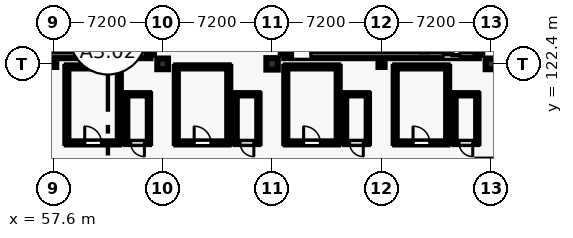
"""IFC4 building model, lengths in metres.
Left out: names, types, materials, properties, quantities, classifications, styles, units other than length and angle.
Written with IfcOpenShell. Run it as: python <this file> out.ifc"""

import sys

from ifc_helpers import new_model, si_unit, direction, frame, frame_2d, origin, origin_2d, place, context, subcontext, project, spatial, rectangle, hollow_rectangle, extrude, element, fill, save


model = new_model("IFC4")
c1 = context("Model", 3, precision=1e-05, world=origin(), true_north=direction((0.0, 1.0)))
c2 = subcontext(c1, "Body", "Model", "MODEL_VIEW")
j1 = project(units=[si_unit("LENGTHUNIT", "METRE"), si_unit("PLANEANGLEUNIT", "RADIAN")], contexts=[c1])
p1 = place(None, origin())
s1 = spatial("IfcSite", under=j1, at=p1, CompositionType="ELEMENT")
p2 = place(p1, origin())
s2 = spatial("IfcBuilding", under=s1, at=p2, CompositionType="ELEMENT")
p3 = place(p2, frame((0.0, 0.0, 9.6)))
s3 = spatial("IfcBuildingStorey", under=s2, at=p3, CompositionType="ELEMENT", Elevation=9.6)
p4 = place(p3, frame((57.6, 122.4, 0.0), z_axis=(0.0, 0.0, 1.0), x_axis=(1.0, 0.0, 0.0)))
e1 = element("IfcColumn", 1, at=p4, inside=s3, PredefinedType="COLUMN", context=c2, shape_type="SweptSolid", body=[
    extrude(hollow_rectangle(XDim=0.4, YDim=0.4, WallThickness=0.02, at=origin_2d()), origin(), (0.0, 0.0, 1.0), 4.2),
])
p5 = place(p3, frame((64.8, 122.4, 0.0), z_axis=(0.0, 0.0, 1.0), x_axis=(1.0, 0.0, 0.0)))
e2 = element("IfcColumn", 2, at=p5, inside=s3, PredefinedType="COLUMN", context=c2, shape_type="SweptSolid", body=[
    extrude(rectangle(XDim=0.7, YDim=0.7, at=origin_2d()), origin(), (0.0, 0.0, 1.0), 4.2),
])
p6 = place(p3, frame((72.0, 122.4, 0.0), z_axis=(0.0, 0.0, 1.0), x_axis=(1.0, 0.0, 0.0)))
e3 = element("IfcColumn", 3, at=p6, inside=s3, PredefinedType="COLUMN", context=c2, shape_type="SweptSolid", body=[
    extrude(rectangle(XDim=0.75, YDim=0.75, at=origin_2d()), origin(), (0.0, 0.0, 1.0), 4.2),
])
p7 = place(p3, frame((79.2, 122.4, 0.0), z_axis=(0.0, 0.0, 1.0), x_axis=(1.0, 0.0, 0.0)))
e4 = element("IfcColumn", 4, at=p7, inside=s3, PredefinedType="COLUMN", context=c2, shape_type="SweptSolid", body=[
    extrude(hollow_rectangle(XDim=0.4, YDim=0.4, WallThickness=0.02, at=origin_2d()), origin(), (0.0, 0.0, 1.0), 4.2),
])
p8 = place(p3, frame((86.4, 122.4, 0.0), z_axis=(0.0, 0.0, 1.0), x_axis=(1.0, 0.0, 0.0)))
e5 = element("IfcColumn", 5, at=p8, inside=s3, PredefinedType="COLUMN", context=c2, shape_type="SweptSolid", body=[
    extrude(rectangle(XDim=0.7, YDim=0.7, at=origin_2d()), origin(), (0.0, 0.0, 1.0), 4.2),
])
p9 = place(p3, frame((72.8, 123.0, 0.0), z_axis=(0.0, 0.0, 1.0), x_axis=(1.0, 0.0, 0.0)))
e6 = element("IfcWall", 6, at=p9, inside=s3, PredefinedType="SHEAR", context=c2, shape_type="SweptSolid", body=[
    extrude(rectangle(XDim=12.8, YDim=0.45, at=frame_2d((6.4, 0.0))), origin(), (0.0, 0.0, 1.0), 3.88),
])
p10 = place(p9, frame((0.55, 0.0, 0.0)))
e7 = element("IfcOpeningElement", 7, at=p10, cuts=e6, PredefinedType="OPENING", context=c2, shape_type="SweptSolid", body=[
    extrude(rectangle(XDim=1.2, YDim=2.25, at=frame_2d((0.6, 1.125))), frame((0.0, 0.235, 0.0), z_axis=(0.0, -1.0, 0.0), x_axis=(1.0, 0.0, 0.0)), (0.0, 0.0, 1.0), 0.47),
])
p11 = place(p9, frame((10.458, 0.0, 0.0)))
e8 = element("IfcOpeningElement", 8, at=p11, cuts=e6, PredefinedType="OPENING", context=c2, shape_type="SweptSolid", body=[
    extrude(rectangle(XDim=1.1, YDim=2.2, at=frame_2d((0.55, 1.1))), frame((0.0, 0.235, 0.0), z_axis=(0.0, -1.0, 0.0), x_axis=(1.0, 0.0, 0.0)), (0.0, 0.0, 1.0), 0.47),
])
for number, where, z_axis, x_axis in (
    (9, (72.8, 123.0, 0.0), (0.0, 0.0, 1.0), (0.0, 1.0, 0.0)),
    (10, (85.6, 123.0, 0.0), (0.0, 0.0, 1.0), (0.0, 1.0, 0.0)),
):
    element("IfcWall", number, at=place(p3, frame(where, z_axis=z_axis, x_axis=x_axis)), inside=s3, PredefinedType="SHEAR", context=c2, shape_type="SweptSolid", body=[
        extrude(rectangle(XDim=6.1, YDim=0.45, at=frame_2d((3.05, 0.0))), origin(), (0.0, 0.0, 1.0), 3.88),
    ])
p12 = place(p3, frame((51.2, 123.0, 0.0), z_axis=(0.0, 0.0, 1.0), x_axis=(1.0, 0.0, 0.0)))
e11 = element("IfcWall", 11, at=p12, inside=s3, PredefinedType="SHEAR", context=c2, shape_type="SweptSolid", body=[
    extrude(rectangle(XDim=12.8, YDim=0.45, at=frame_2d((6.4, 0.0))), origin(), (0.0, 0.0, 1.0), 3.88),
])
p13 = place(p12, frame((0.55, 0.0, 0.0)))
e12 = element("IfcOpeningElement", 12, at=p13, cuts=e11, PredefinedType="OPENING", context=c2, shape_type="SweptSolid", body=[
    extrude(rectangle(XDim=1.2, YDim=2.25, at=frame_2d((0.6, 1.125))), frame((0.0, 0.235, 0.0), z_axis=(0.0, -1.0, 0.0), x_axis=(1.0, 0.0, 0.0)), (0.0, 0.0, 1.0), 0.47),
])
p14 = place(p12, frame((10.458, 0.0, 0.0)))
e13 = element("IfcOpeningElement", 13, at=p14, cuts=e11, PredefinedType="OPENING", context=c2, shape_type="SweptSolid", body=[
    extrude(rectangle(XDim=1.1, YDim=2.2, at=frame_2d((0.55, 1.1))), frame((0.0, 0.235, 0.0), z_axis=(0.0, -1.0, 0.0), x_axis=(1.0, 0.0, 0.0)), (0.0, 0.0, 1.0), 0.47),
])
p15 = place(p3, frame((64.0, 123.0, 0.0), z_axis=(0.0, 0.0, 1.0), x_axis=(0.0, 1.0, 0.0)))
e14 = element("IfcWall", 14, at=p15, inside=s3, PredefinedType="SHEAR", context=c2, shape_type="SweptSolid", body=[
    extrude(rectangle(XDim=6.1, YDim=0.45, at=frame_2d((3.05, 0.0))), origin(), (0.0, 0.0, 1.0), 3.88),
])
p16 = place(p3, frame((58.5, 117.2, 0.0), z_axis=(0.0, 0.0, 1.0), x_axis=(1.0, 0.0, 0.0)))
e15 = element("IfcWall", 15, at=p16, inside=s3, PredefinedType="PARTITIONING", context=c2, shape_type="SweptSolid", body=[
    extrude(rectangle(XDim=3.45, YDim=0.2, at=frame_2d((1.725, 0.0))), origin(), (0.0, 0.0, 1.0), 2.94),
])
p17 = place(p16, frame((1.175, 0.0, 0.0)))
e16 = element("IfcOpeningElement", 16, at=p17, cuts=e15, PredefinedType="OPENING", context=c2, shape_type="SweptSolid", body=[
    extrude(rectangle(XDim=1.1, YDim=2.25, at=frame_2d((0.55, 1.125))), frame((0.0, 0.11, 0.0), z_axis=(0.0, -1.0, 0.0), x_axis=(1.0, 0.0, 0.0)), (0.0, 0.0, 1.0), 0.22),
])
p18 = place(p3, frame((61.95, 117.2, 0.0), z_axis=(0.0, 0.0, 1.0), x_axis=(0.0, 1.0, 0.0)))
e17 = element("IfcWall", 17, at=p18, inside=s3, PredefinedType="PARTITIONING", context=c2, shape_type="SweptSolid", body=[
    extrude(rectangle(XDim=5.0, YDim=0.2, at=frame_2d((2.5, 0.0))), origin(), (0.0, 0.0, 1.0), 2.94),
])
p19 = place(p3, frame((61.95, 122.2, 0.0), z_axis=(0.0, 0.0, 1.0), x_axis=(-1.0, 0.0, 0.0)))
e18 = element("IfcWall", 18, at=p19, inside=s3, PredefinedType="PARTITIONING", context=c2, shape_type="SweptSolid", body=[
    extrude(rectangle(XDim=3.45, YDim=0.2, at=frame_2d((1.725, 0.0))), origin(), (0.0, 0.0, 1.0), 2.94),
])
p20 = place(p3, frame((58.5, 122.2, 0.0), z_axis=(0.0, 0.0, 1.0), x_axis=(0.0, -1.0, 0.0)))
e19 = element("IfcWall", 19, at=p20, inside=s3, PredefinedType="PARTITIONING", context=c2, shape_type="SweptSolid", body=[
    extrude(rectangle(XDim=5.0, YDim=0.2, at=frame_2d((2.5, 0.0))), origin(), (0.0, 0.0, 1.0), 2.94),
])
p21 = place(p3, frame((62.4, 117.2, 0.0), z_axis=(0.0, 0.0, 1.0), x_axis=(1.0, 0.0, 0.0)))
e20 = element("IfcWall", 20, at=p21, inside=s3, PredefinedType="PARTITIONING", context=c2, shape_type="SweptSolid", body=[
    extrude(rectangle(XDim=1.5, YDim=0.15, at=frame_2d((0.75, 0.0))), origin(), (0.0, 0.0, 1.0), 2.94),
])
p22 = place(p21, frame((0.3, 0.0, 0.0)))
e21 = element("IfcOpeningElement", 21, at=p22, cuts=e20, PredefinedType="OPENING", context=c2, shape_type="SweptSolid", body=[
    extrude(rectangle(XDim=0.9, YDim=2.15, at=frame_2d((0.45, 1.075))), frame((0.0, 0.085, 0.0), z_axis=(0.0, -1.0, 0.0), x_axis=(1.0, 0.0, 0.0)), (0.0, 0.0, 1.0), 0.17),
])
p23 = place(p3, frame((63.9, 117.2, 0.0), z_axis=(0.0, 0.0, 1.0), x_axis=(0.0, 1.0, 0.0)))
e22 = element("IfcWall", 22, at=p23, inside=s3, PredefinedType="PARTITIONING", context=c2, shape_type="SweptSolid", body=[
    extrude(rectangle(XDim=3.2, YDim=0.15, at=frame_2d((1.6, 0.0))), origin(), (0.0, 0.0, 1.0), 2.94),
])
p24 = place(p3, frame((63.9, 120.4, 0.0), z_axis=(0.0, 0.0, 1.0), x_axis=(-1.0, 0.0, 0.0)))
e23 = element("IfcWall", 23, at=p24, inside=s3, PredefinedType="PARTITIONING", context=c2, shape_type="SweptSolid", body=[
    extrude(rectangle(XDim=1.5, YDim=0.15, at=frame_2d((0.75, 0.0))), origin(), (0.0, 0.0, 1.0), 2.94),
])
p25 = place(p3, frame((62.4, 120.4, 0.0), z_axis=(0.0, 0.0, 1.0), x_axis=(0.0, -1.0, 0.0)))
e24 = element("IfcWall", 24, at=p25, inside=s3, PredefinedType="PARTITIONING", context=c2, shape_type="SweptSolid", body=[
    extrude(rectangle(XDim=3.2, YDim=0.15, at=frame_2d((1.6, 0.0))), origin(), (0.0, 0.0, 1.0), 2.94),
])
p26 = place(p3, frame((65.7, 117.2, 0.0), z_axis=(0.0, 0.0, 1.0), x_axis=(1.0, 0.0, 0.0)))
e25 = element("IfcWall", 25, at=p26, inside=s3, PredefinedType="PARTITIONING", context=c2, shape_type="SweptSolid", body=[
    extrude(rectangle(XDim=3.45, YDim=0.2, at=frame_2d((1.725, 0.0))), origin(), (0.0, 0.0, 1.0), 2.94),
])
p27 = place(p26, frame((1.175, 0.0, 0.0)))
e26 = element("IfcOpeningElement", 26, at=p27, cuts=e25, PredefinedType="OPENING", context=c2, shape_type="SweptSolid", body=[
    extrude(rectangle(XDim=1.1, YDim=2.25, at=frame_2d((0.55, 1.125))), frame((0.0, 0.11, 0.0), z_axis=(0.0, -1.0, 0.0), x_axis=(1.0, 0.0, 0.0)), (0.0, 0.0, 1.0), 0.22),
])
p28 = place(p3, frame((69.15, 117.2, 0.0), z_axis=(0.0, 0.0, 1.0), x_axis=(0.0, 1.0, 0.0)))
e27 = element("IfcWall", 27, at=p28, inside=s3, PredefinedType="PARTITIONING", context=c2, shape_type="SweptSolid", body=[
    extrude(rectangle(XDim=5.0, YDim=0.2, at=frame_2d((2.5, 0.0))), origin(), (0.0, 0.0, 1.0), 2.94),
])
p29 = place(p3, frame((69.15, 122.2, 0.0), z_axis=(0.0, 0.0, 1.0), x_axis=(-1.0, 0.0, 0.0)))
e28 = element("IfcWall", 28, at=p29, inside=s3, PredefinedType="PARTITIONING", context=c2, shape_type="SweptSolid", body=[
    extrude(rectangle(XDim=3.45, YDim=0.2, at=frame_2d((1.725, 0.0))), origin(), (0.0, 0.0, 1.0), 2.94),
])
p30 = place(p3, frame((65.7, 122.2, 0.0), z_axis=(0.0, 0.0, 1.0), x_axis=(0.0, -1.0, 0.0)))
e29 = element("IfcWall", 29, at=p30, inside=s3, PredefinedType="PARTITIONING", context=c2, shape_type="SweptSolid", body=[
    extrude(rectangle(XDim=5.0, YDim=0.2, at=frame_2d((2.5, 0.0))), origin(), (0.0, 0.0, 1.0), 2.94),
])
p31 = place(p3, frame((69.6, 117.2, 0.0), z_axis=(0.0, 0.0, 1.0), x_axis=(1.0, 0.0, 0.0)))
e30 = element("IfcWall", 30, at=p31, inside=s3, PredefinedType="PARTITIONING", context=c2, shape_type="SweptSolid", body=[
    extrude(rectangle(XDim=1.5, YDim=0.15, at=frame_2d((0.75, 0.0))), origin(), (0.0, 0.0, 1.0), 2.94),
])
p32 = place(p31, frame((0.3, 0.0, 0.0)))
e31 = element("IfcOpeningElement", 31, at=p32, cuts=e30, PredefinedType="OPENING", context=c2, shape_type="SweptSolid", body=[
    extrude(rectangle(XDim=0.9, YDim=2.15, at=frame_2d((0.45, 1.075))), frame((0.0, 0.085, 0.0), z_axis=(0.0, -1.0, 0.0), x_axis=(1.0, 0.0, 0.0)), (0.0, 0.0, 1.0), 0.17),
])
p33 = place(p3, frame((71.1, 117.2, 0.0), z_axis=(0.0, 0.0, 1.0), x_axis=(0.0, 1.0, 0.0)))
e32 = element("IfcWall", 32, at=p33, inside=s3, PredefinedType="PARTITIONING", context=c2, shape_type="SweptSolid", body=[
    extrude(rectangle(XDim=3.2, YDim=0.15, at=frame_2d((1.6, 0.0))), origin(), (0.0, 0.0, 1.0), 2.94),
])
p34 = place(p3, frame((71.1, 120.4, 0.0), z_axis=(0.0, 0.0, 1.0), x_axis=(-1.0, 0.0, 0.0)))
e33 = element("IfcWall", 33, at=p34, inside=s3, PredefinedType="PARTITIONING", context=c2, shape_type="SweptSolid", body=[
    extrude(rectangle(XDim=1.5, YDim=0.15, at=frame_2d((0.75, 0.0))), origin(), (0.0, 0.0, 1.0), 2.94),
])
p35 = place(p3, frame((69.6, 120.4, 0.0), z_axis=(0.0, 0.0, 1.0), x_axis=(0.0, -1.0, 0.0)))
e34 = element("IfcWall", 34, at=p35, inside=s3, PredefinedType="PARTITIONING", context=c2, shape_type="SweptSolid", body=[
    extrude(rectangle(XDim=3.2, YDim=0.15, at=frame_2d((1.6, 0.0))), origin(), (0.0, 0.0, 1.0), 2.94),
])
p36 = place(p3, frame((72.9, 117.2, 0.0), z_axis=(0.0, 0.0, 1.0), x_axis=(1.0, 0.0, 0.0)))
e35 = element("IfcWall", 35, at=p36, inside=s3, PredefinedType="PARTITIONING", context=c2, shape_type="SweptSolid", body=[
    extrude(rectangle(XDim=3.45, YDim=0.2, at=frame_2d((1.725, 0.0))), origin(), (0.0, 0.0, 1.0), 2.94),
])
p37 = place(p36, frame((1.175, 0.0, 0.0)))
e36 = element("IfcOpeningElement", 36, at=p37, cuts=e35, PredefinedType="OPENING", context=c2, shape_type="SweptSolid", body=[
    extrude(rectangle(XDim=1.1, YDim=2.25, at=frame_2d((0.55, 1.125))), frame((0.0, 0.11, 0.0), z_axis=(0.0, -1.0, 0.0), x_axis=(1.0, 0.0, 0.0)), (0.0, 0.0, 1.0), 0.22),
])
p38 = place(p3, frame((76.35, 117.2, 0.0), z_axis=(0.0, 0.0, 1.0), x_axis=(0.0, 1.0, 0.0)))
e37 = element("IfcWall", 37, at=p38, inside=s3, PredefinedType="PARTITIONING", context=c2, shape_type="SweptSolid", body=[
    extrude(rectangle(XDim=5.0, YDim=0.2, at=frame_2d((2.5, 0.0))), origin(), (0.0, 0.0, 1.0), 2.94),
])
p39 = place(p3, frame((76.35, 122.2, 0.0), z_axis=(0.0, 0.0, 1.0), x_axis=(-1.0, 0.0, 0.0)))
e38 = element("IfcWall", 38, at=p39, inside=s3, PredefinedType="PARTITIONING", context=c2, shape_type="SweptSolid", body=[
    extrude(rectangle(XDim=3.45, YDim=0.2, at=frame_2d((1.725, 0.0))), origin(), (0.0, 0.0, 1.0), 2.94),
])
p40 = place(p3, frame((72.9, 122.2, 0.0), z_axis=(0.0, 0.0, 1.0), x_axis=(0.0, -1.0, 0.0)))
e39 = element("IfcWall", 39, at=p40, inside=s3, PredefinedType="PARTITIONING", context=c2, shape_type="SweptSolid", body=[
    extrude(rectangle(XDim=5.0, YDim=0.2, at=frame_2d((2.5, 0.0))), origin(), (0.0, 0.0, 1.0), 2.94),
])
p41 = place(p3, frame((76.8, 117.2, 0.0), z_axis=(0.0, 0.0, 1.0), x_axis=(1.0, 0.0, 0.0)))
e40 = element("IfcWall", 40, at=p41, inside=s3, PredefinedType="PARTITIONING", context=c2, shape_type="SweptSolid", body=[
    extrude(rectangle(XDim=1.5, YDim=0.15, at=frame_2d((0.75, 0.0))), origin(), (0.0, 0.0, 1.0), 2.94),
])
p42 = place(p41, frame((0.3, 0.0, 0.0)))
e41 = element("IfcOpeningElement", 41, at=p42, cuts=e40, PredefinedType="OPENING", context=c2, shape_type="SweptSolid", body=[
    extrude(rectangle(XDim=0.9, YDim=2.15, at=frame_2d((0.45, 1.075))), frame((0.0, 0.085, 0.0), z_axis=(0.0, -1.0, 0.0), x_axis=(1.0, 0.0, 0.0)), (0.0, 0.0, 1.0), 0.17),
])
p43 = place(p3, frame((78.3, 117.2, 0.0), z_axis=(0.0, 0.0, 1.0), x_axis=(0.0, 1.0, 0.0)))
e42 = element("IfcWall", 42, at=p43, inside=s3, PredefinedType="PARTITIONING", context=c2, shape_type="SweptSolid", body=[
    extrude(rectangle(XDim=3.2, YDim=0.15, at=frame_2d((1.6, 0.0))), origin(), (0.0, 0.0, 1.0), 2.94),
])
p44 = place(p3, frame((78.3, 120.4, 0.0), z_axis=(0.0, 0.0, 1.0), x_axis=(-1.0, 0.0, 0.0)))
e43 = element("IfcWall", 43, at=p44, inside=s3, PredefinedType="PARTITIONING", context=c2, shape_type="SweptSolid", body=[
    extrude(rectangle(XDim=1.5, YDim=0.15, at=frame_2d((0.75, 0.0))), origin(), (0.0, 0.0, 1.0), 2.94),
])
p45 = place(p3, frame((76.8, 120.4, 0.0), z_axis=(0.0, 0.0, 1.0), x_axis=(0.0, -1.0, 0.0)))
e44 = element("IfcWall", 44, at=p45, inside=s3, PredefinedType="PARTITIONING", context=c2, shape_type="SweptSolid", body=[
    extrude(rectangle(XDim=3.2, YDim=0.15, at=frame_2d((1.6, 0.0))), origin(), (0.0, 0.0, 1.0), 2.94),
])
p46 = place(p3, frame((80.1, 117.2, 0.0), z_axis=(0.0, 0.0, 1.0), x_axis=(1.0, 0.0, 0.0)))
e45 = element("IfcWall", 45, at=p46, inside=s3, PredefinedType="PARTITIONING", context=c2, shape_type="SweptSolid", body=[
    extrude(rectangle(XDim=3.45, YDim=0.2, at=frame_2d((1.725, 0.0))), origin(), (0.0, 0.0, 1.0), 2.94),
])
p47 = place(p46, frame((1.175, 0.0, 0.0)))
e46 = element("IfcOpeningElement", 46, at=p47, cuts=e45, PredefinedType="OPENING", context=c2, shape_type="SweptSolid", body=[
    extrude(rectangle(XDim=1.1, YDim=2.25, at=frame_2d((0.55, 1.125))), frame((0.0, 0.11, 0.0), z_axis=(0.0, -1.0, 0.0), x_axis=(1.0, 0.0, 0.0)), (0.0, 0.0, 1.0), 0.22),
])
p48 = place(p3, frame((83.55, 117.2, 0.0), z_axis=(0.0, 0.0, 1.0), x_axis=(0.0, 1.0, 0.0)))
e47 = element("IfcWall", 47, at=p48, inside=s3, PredefinedType="PARTITIONING", context=c2, shape_type="SweptSolid", body=[
    extrude(rectangle(XDim=5.0, YDim=0.2, at=frame_2d((2.5, 0.0))), origin(), (0.0, 0.0, 1.0), 2.94),
])
p49 = place(p3, frame((83.55, 122.2, 0.0), z_axis=(0.0, 0.0, 1.0), x_axis=(-1.0, 0.0, 0.0)))
e48 = element("IfcWall", 48, at=p49, inside=s3, PredefinedType="PARTITIONING", context=c2, shape_type="SweptSolid", body=[
    extrude(rectangle(XDim=3.45, YDim=0.2, at=frame_2d((1.725, 0.0))), origin(), (0.0, 0.0, 1.0), 2.94),
])
p50 = place(p3, frame((80.1, 122.2, 0.0), z_axis=(0.0, 0.0, 1.0), x_axis=(0.0, -1.0, 0.0)))
e49 = element("IfcWall", 49, at=p50, inside=s3, PredefinedType="PARTITIONING", context=c2, shape_type="SweptSolid", body=[
    extrude(rectangle(XDim=5.0, YDim=0.2, at=frame_2d((2.5, 0.0))), origin(), (0.0, 0.0, 1.0), 2.94),
])
p51 = place(p3, frame((84.0, 117.2, 0.0), z_axis=(0.0, 0.0, 1.0), x_axis=(1.0, 0.0, 0.0)))
e50 = element("IfcWall", 50, at=p51, inside=s3, PredefinedType="PARTITIONING", context=c2, shape_type="SweptSolid", body=[
    extrude(rectangle(XDim=1.5, YDim=0.15, at=frame_2d((0.75, 0.0))), origin(), (0.0, 0.0, 1.0), 2.94),
])
p52 = place(p51, frame((0.3, 0.0, 0.0)))
e51 = element("IfcOpeningElement", 51, at=p52, cuts=e50, PredefinedType="OPENING", context=c2, shape_type="SweptSolid", body=[
    extrude(rectangle(XDim=0.9, YDim=2.15, at=frame_2d((0.45, 1.075))), frame((0.0, 0.085, 0.0), z_axis=(0.0, -1.0, 0.0), x_axis=(1.0, 0.0, 0.0)), (0.0, 0.0, 1.0), 0.17),
])
p53 = place(p3, frame((85.5, 117.2, 0.0), z_axis=(0.0, 0.0, 1.0), x_axis=(0.0, 1.0, 0.0)))
e52 = element("IfcWall", 52, at=p53, inside=s3, PredefinedType="PARTITIONING", context=c2, shape_type="SweptSolid", body=[
    extrude(rectangle(XDim=3.2, YDim=0.15, at=frame_2d((1.6, 0.0))), origin(), (0.0, 0.0, 1.0), 2.94),
])
p54 = place(p3, frame((85.5, 120.4, 0.0), z_axis=(0.0, 0.0, 1.0), x_axis=(-1.0, 0.0, 0.0)))
e53 = element("IfcWall", 53, at=p54, inside=s3, PredefinedType="PARTITIONING", context=c2, shape_type="SweptSolid", body=[
    extrude(rectangle(XDim=1.5, YDim=0.15, at=frame_2d((0.75, 0.0))), origin(), (0.0, 0.0, 1.0), 2.94),
])
p55 = place(p3, frame((84.0, 120.4, 0.0), z_axis=(0.0, 0.0, 1.0), x_axis=(0.0, -1.0, 0.0)))
e54 = element("IfcWall", 54, at=p55, inside=s3, PredefinedType="PARTITIONING", context=c2, shape_type="SweptSolid", body=[
    extrude(rectangle(XDim=3.2, YDim=0.15, at=frame_2d((1.6, 0.0))), origin(), (0.0, 0.0, 1.0), 2.94),
])
p56 = place(p10, origin())
e55 = element("IfcDoor", 55, at=p56, inside=s3, OperationType="SINGLE_SWING_RIGHT", PredefinedType="DOOR", context=c2, shape_type="SweptSolid", body=[
    extrude(rectangle(XDim=1.2, YDim=2.25, at=frame_2d((0.6, 1.125))), frame((0.0, 0.025, 0.0), z_axis=(0.0, -1.0, 0.0), x_axis=(1.0, 0.0, 0.0)), (0.0, 0.0, 1.0), 0.05),
])
fill(e7, e55)
p57 = place(p11, origin())
e56 = element("IfcDoor", 56, at=p57, inside=s3, OperationType="SLIDING_TO_RIGHT", PredefinedType="DOOR", context=c2, shape_type="SweptSolid", body=[
    extrude(rectangle(XDim=1.1, YDim=2.2, at=frame_2d((0.55, 1.1))), frame((0.0, 0.025, 0.0), z_axis=(0.0, -1.0, 0.0), x_axis=(1.0, 0.0, 0.0)), (0.0, 0.0, 1.0), 0.05),
])
fill(e8, e56)
p58 = place(p14, origin())
e57 = element("IfcDoor", 57, at=p58, inside=s3, OperationType="SLIDING_TO_LEFT", PredefinedType="DOOR", context=c2, shape_type="SweptSolid", body=[
    extrude(rectangle(XDim=1.1, YDim=2.2, at=frame_2d((0.55, 1.1))), frame((0.0, 0.025, 0.0), z_axis=(0.0, -1.0, 0.0), x_axis=(1.0, 0.0, 0.0)), (0.0, 0.0, 1.0), 0.05),
])
fill(e13, e57)
p59 = place(p17, origin())
e58 = element("IfcDoor", 58, at=p59, inside=s3, OperationType="SINGLE_SWING_LEFT", PredefinedType="DOOR", context=c2, shape_type="SweptSolid", body=[
    extrude(rectangle(XDim=1.1, YDim=2.25, at=frame_2d((0.55, 1.125))), frame((0.0, 0.025, 0.0), z_axis=(0.0, -1.0, 0.0), x_axis=(1.0, 0.0, 0.0)), (0.0, 0.0, 1.0), 0.05),
])
fill(e16, e58)
p60 = place(p22, frame((0.9, 0.0, 0.0), z_axis=(0.0, 0.0, 1.0), x_axis=(-1.0, 0.0, 0.0)))
e59 = element("IfcDoor", 59, at=p60, inside=s3, OperationType="SINGLE_SWING_RIGHT", PredefinedType="DOOR", context=c2, shape_type="SweptSolid", body=[
    extrude(rectangle(XDim=0.9, YDim=2.15, at=frame_2d((0.45, 1.075))), frame((0.0, 0.025, 0.0), z_axis=(0.0, -1.0, 0.0), x_axis=(1.0, 0.0, 0.0)), (0.0, 0.0, 1.0), 0.05),
])
fill(e21, e59)
p61 = place(p27, origin())
e60 = element("IfcDoor", 60, at=p61, inside=s3, OperationType="SINGLE_SWING_LEFT", PredefinedType="DOOR", context=c2, shape_type="SweptSolid", body=[
    extrude(rectangle(XDim=1.1, YDim=2.25, at=frame_2d((0.55, 1.125))), frame((0.0, 0.025, 0.0), z_axis=(0.0, -1.0, 0.0), x_axis=(1.0, 0.0, 0.0)), (0.0, 0.0, 1.0), 0.05),
])
fill(e26, e60)
p62 = place(p32, frame((0.9, 0.0, 0.0), z_axis=(0.0, 0.0, 1.0), x_axis=(-1.0, 0.0, 0.0)))
e61 = element("IfcDoor", 61, at=p62, inside=s3, OperationType="SINGLE_SWING_RIGHT", PredefinedType="DOOR", context=c2, shape_type="SweptSolid", body=[
    extrude(rectangle(XDim=0.9, YDim=2.15, at=frame_2d((0.45, 1.075))), frame((0.0, 0.025, 0.0), z_axis=(0.0, -1.0, 0.0), x_axis=(1.0, 0.0, 0.0)), (0.0, 0.0, 1.0), 0.05),
])
fill(e31, e61)
p63 = place(p37, origin())
e62 = element("IfcDoor", 62, at=p63, inside=s3, OperationType="SINGLE_SWING_LEFT", PredefinedType="DOOR", context=c2, shape_type="SweptSolid", body=[
    extrude(rectangle(XDim=1.1, YDim=2.25, at=frame_2d((0.55, 1.125))), frame((0.0, 0.025, 0.0), z_axis=(0.0, -1.0, 0.0), x_axis=(1.0, 0.0, 0.0)), (0.0, 0.0, 1.0), 0.05),
])
fill(e36, e62)
p64 = place(p42, frame((0.9, 0.0, 0.0), z_axis=(0.0, 0.0, 1.0), x_axis=(-1.0, 0.0, 0.0)))
e63 = element("IfcDoor", 63, at=p64, inside=s3, OperationType="SINGLE_SWING_RIGHT", PredefinedType="DOOR", context=c2, shape_type="SweptSolid", body=[
    extrude(rectangle(XDim=0.9, YDim=2.15, at=frame_2d((0.45, 1.075))), frame((0.0, 0.025, 0.0), z_axis=(0.0, -1.0, 0.0), x_axis=(1.0, 0.0, 0.0)), (0.0, 0.0, 1.0), 0.05),
])
fill(e41, e63)
p65 = place(p47, origin())
e64 = element("IfcDoor", 64, at=p65, inside=s3, OperationType="SINGLE_SWING_LEFT", PredefinedType="DOOR", context=c2, shape_type="SweptSolid", body=[
    extrude(rectangle(XDim=1.1, YDim=2.25, at=frame_2d((0.55, 1.125))), frame((0.0, 0.025, 0.0), z_axis=(0.0, -1.0, 0.0), x_axis=(1.0, 0.0, 0.0)), (0.0, 0.0, 1.0), 0.05),
])
fill(e46, e64)
p66 = place(p52, frame((0.9, 0.0, 0.0), z_axis=(0.0, 0.0, 1.0), x_axis=(-1.0, 0.0, 0.0)))
e65 = element("IfcDoor", 65, at=p66, inside=s3, OperationType="SINGLE_SWING_RIGHT", PredefinedType="DOOR", context=c2, shape_type="SweptSolid", body=[
    extrude(rectangle(XDim=0.9, YDim=2.15, at=frame_2d((0.45, 1.075))), frame((0.0, 0.025, 0.0), z_axis=(0.0, -1.0, 0.0), x_axis=(1.0, 0.0, 0.0)), (0.0, 0.0, 1.0), 0.05),
])
fill(e51, e65)
save(model, sys.argv[1])
